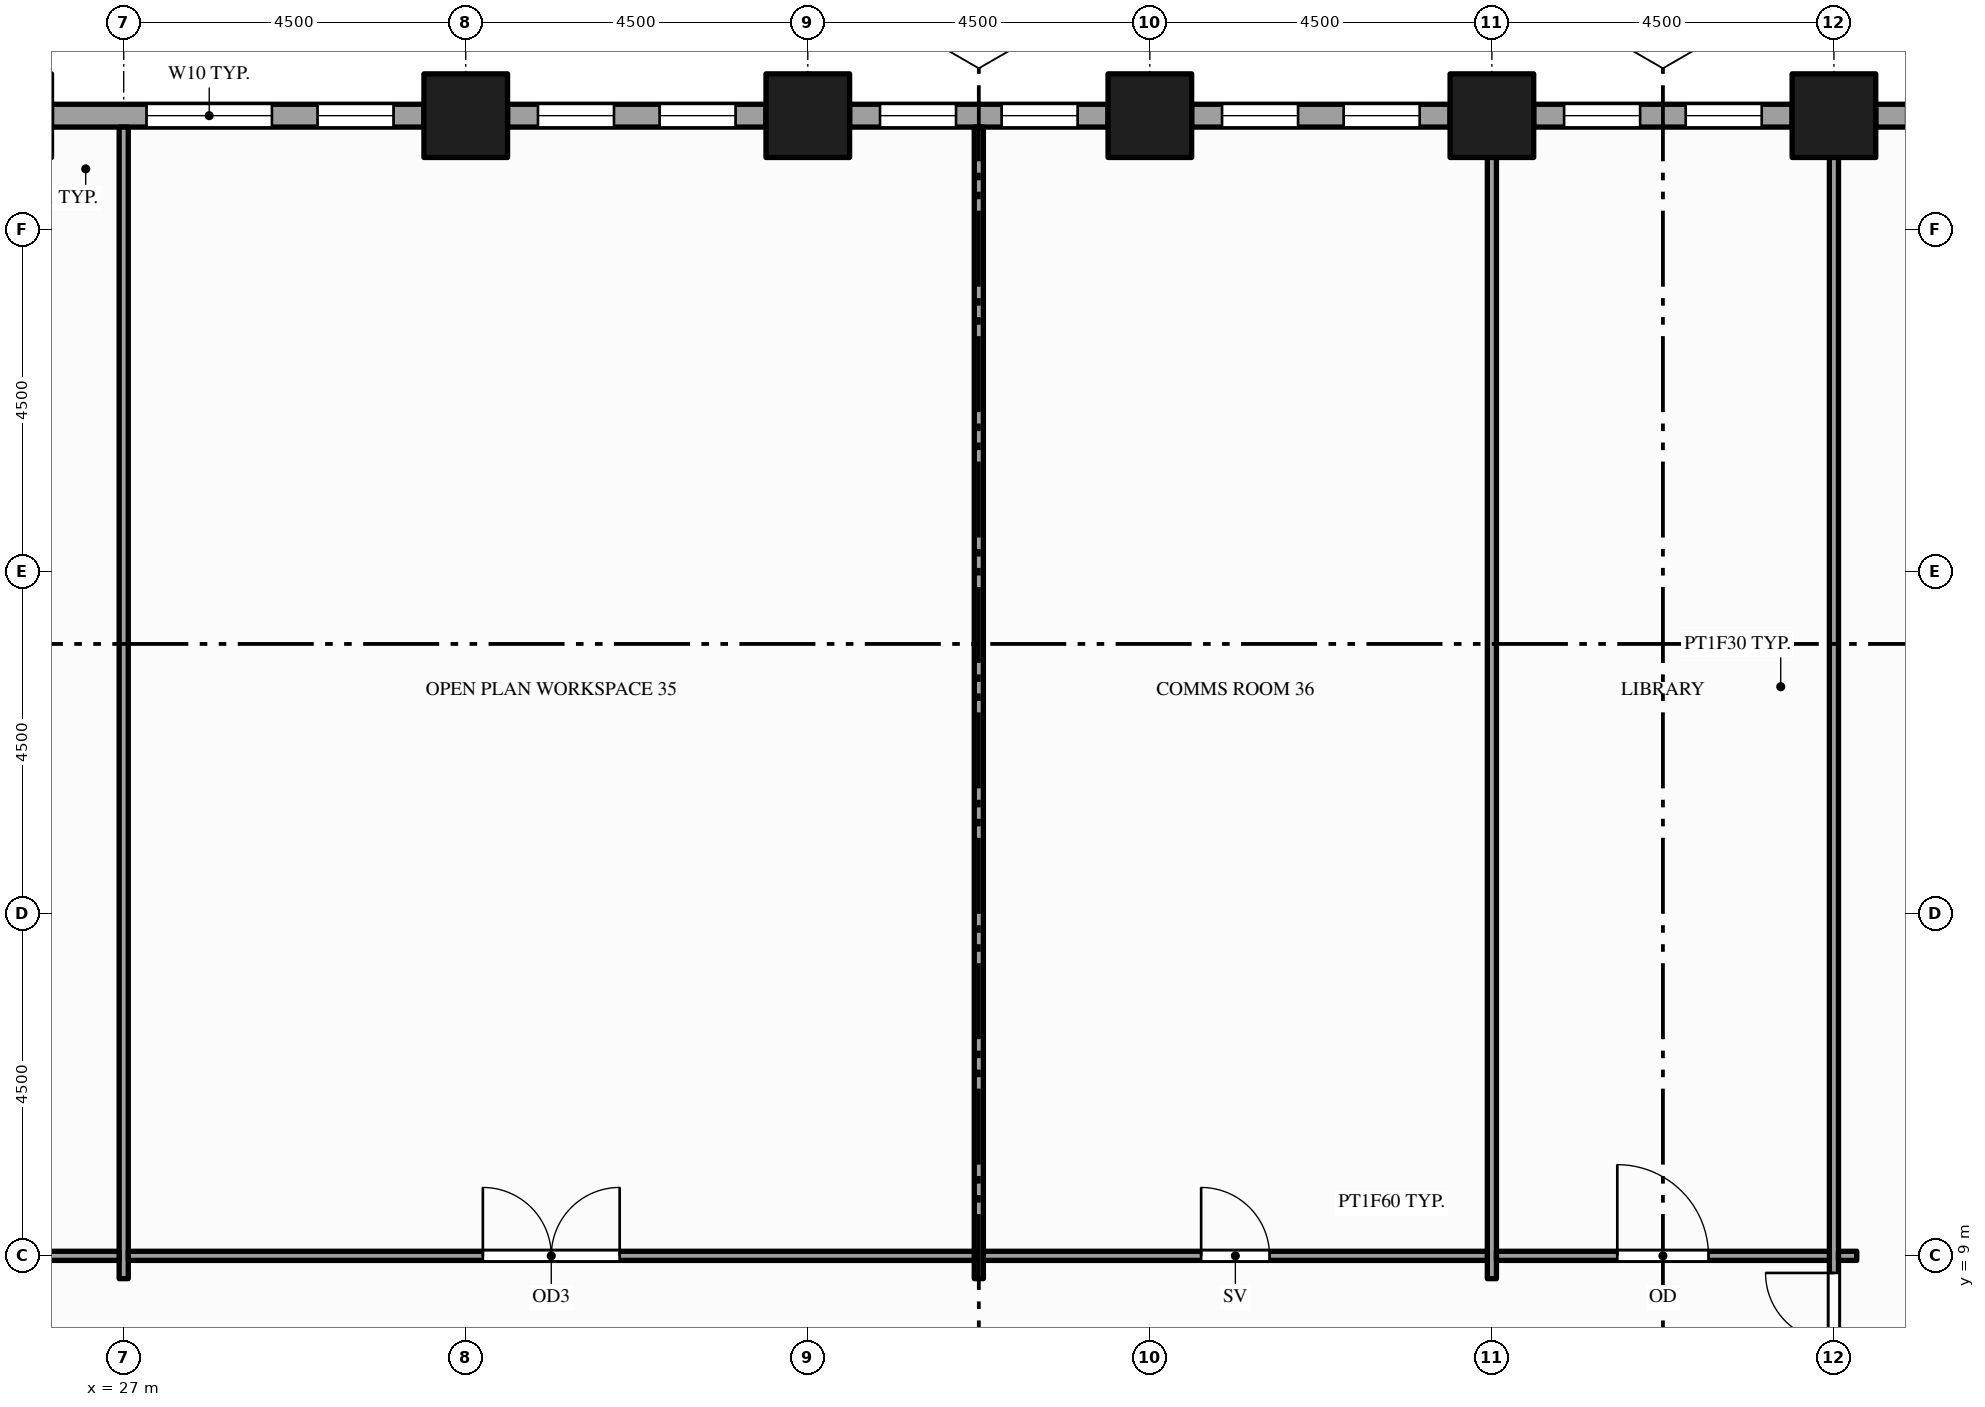
"""IFC4 building model, lengths in metres.
Left out: names, types, materials, properties, quantities, classifications, styles, units other than length and angle.
Written with IfcOpenShell. Run it as: python <this file> out.ifc"""

import sys

from ifc_helpers import new_model, si_unit, direction, frame, frame_2d, origin, origin_2d, place, context, subcontext, project, spatial, rectangle, hollow_rectangle, extrude, element, fill, save


model = new_model("IFC4")
c1 = context("Model", 3, precision=1e-05, world=origin(), true_north=direction((0.0, 1.0)))
c2 = subcontext(c1, "Body", "Model", "MODEL_VIEW")
j1 = project(units=[si_unit("LENGTHUNIT", "METRE"), si_unit("PLANEANGLEUNIT", "RADIAN")], contexts=[c1])
p1 = place(None, origin())
s1 = spatial("IfcSite", under=j1, at=p1, CompositionType="ELEMENT")
p2 = place(p1, origin())
s2 = spatial("IfcBuilding", under=s1, at=p2, CompositionType="ELEMENT")
p3 = place(p2, frame((0.0, 0.0, 57.0)))
s3 = spatial("IfcBuildingStorey", under=s2, at=p3, CompositionType="ELEMENT", Elevation=57.0)
for number, where, z_axis, x_axis in (
    (1, (31.5, 24.0, -0.15), (0.0, 0.0, 1.0), (1.0, 0.0, 0.0)),
    (2, (36.0, 24.0, -0.15), (0.0, 0.0, 1.0), (1.0, 0.0, 0.0)),
    (3, (40.5, 24.0, -0.15), (0.0, 0.0, 1.0), (1.0, 0.0, 0.0)),
    (4, (45.0, 24.0, -0.15), (0.0, 0.0, 1.0), (1.0, 0.0, 0.0)),
    (5, (49.5, 24.0, -0.15), (0.0, 0.0, 1.0), (1.0, 0.0, 0.0)),
):
    element("IfcColumn", number, at=place(p3, frame(where, z_axis=z_axis, x_axis=x_axis)), inside=s3, PredefinedType="COLUMN", context=c2, shape_type="SweptSolid", body=[
        extrude(hollow_rectangle(XDim=1.1, YDim=1.1, WallThickness=0.06, at=origin_2d()), origin(), (0.0, 0.0, 1.0), 4.0),
    ])
p4 = place(p3, frame((53.45, 24.0, 0.0), z_axis=(0.0, 0.0, 1.0), x_axis=(-1.0, 0.0, 0.0)))
e6 = element("IfcWall", 6, at=p4, inside=s3, PredefinedType="STANDARD", context=c2, shape_type="SweptSolid", body=[
    extrude(rectangle(XDim=3.4, YDim=0.3, at=frame_2d((1.7, 0.0))), origin(), (0.0, 0.0, 1.0), 3.144),
])
p5 = place(p4, frame((0.4, 0.0, 0.9)))
e7 = element("IfcOpeningElement", 7, at=p5, cuts=e6, PredefinedType="OPENING", context=c2, shape_type="SweptSolid", body=[
    extrude(rectangle(XDim=1.0, YDim=2.0, at=frame_2d((0.5, 1.0))), frame((0.0, 0.16, 0.0), z_axis=(0.0, -1.0, 0.0), x_axis=(1.0, 0.0, 0.0)), (0.0, 0.0, 1.0), 0.32),
])
p6 = place(p4, frame((2.0, 0.0, 0.9)))
e8 = element("IfcOpeningElement", 8, at=p6, cuts=e6, PredefinedType="OPENING", context=c2, shape_type="SweptSolid", body=[
    extrude(rectangle(XDim=1.0, YDim=2.0, at=frame_2d((0.5, 1.0))), frame((0.0, 0.16, 0.0), z_axis=(0.0, -1.0, 0.0), x_axis=(1.0, 0.0, 0.0)), (0.0, 0.0, 1.0), 0.32),
])
p7 = place(p3, frame((48.95, 24.0, 0.0), z_axis=(0.0, 0.0, 1.0), x_axis=(-1.0, 0.0, 0.0)))
e9 = element("IfcWall", 9, at=p7, inside=s3, PredefinedType="STANDARD", context=c2, shape_type="SweptSolid", body=[
    extrude(rectangle(XDim=3.4, YDim=0.3, at=frame_2d((1.7, 0.0))), origin(), (0.0, 0.0, 1.0), 3.144),
])
p8 = place(p7, frame((0.4, 0.0, 0.9)))
e10 = element("IfcOpeningElement", 10, at=p8, cuts=e9, PredefinedType="OPENING", context=c2, shape_type="SweptSolid", body=[
    extrude(rectangle(XDim=1.0, YDim=2.0, at=frame_2d((0.5, 1.0))), frame((0.0, 0.16, 0.0), z_axis=(0.0, -1.0, 0.0), x_axis=(1.0, 0.0, 0.0)), (0.0, 0.0, 1.0), 0.32),
])
p9 = place(p7, frame((2.0, 0.0, 0.9)))
e11 = element("IfcOpeningElement", 11, at=p9, cuts=e9, PredefinedType="OPENING", context=c2, shape_type="SweptSolid", body=[
    extrude(rectangle(XDim=1.0, YDim=2.0, at=frame_2d((0.5, 1.0))), frame((0.0, 0.16, 0.0), z_axis=(0.0, -1.0, 0.0), x_axis=(1.0, 0.0, 0.0)), (0.0, 0.0, 1.0), 0.32),
])
p10 = place(p3, frame((44.45, 24.0, 0.0), z_axis=(0.0, 0.0, 1.0), x_axis=(-1.0, 0.0, 0.0)))
e12 = element("IfcWall", 12, at=p10, inside=s3, PredefinedType="STANDARD", context=c2, shape_type="SweptSolid", body=[
    extrude(rectangle(XDim=3.4, YDim=0.3, at=frame_2d((1.7, 0.0))), origin(), (0.0, 0.0, 1.0), 3.144),
])
p11 = place(p10, frame((0.4, 0.0, 0.9)))
e13 = element("IfcOpeningElement", 13, at=p11, cuts=e12, PredefinedType="OPENING", context=c2, shape_type="SweptSolid", body=[
    extrude(rectangle(XDim=1.0, YDim=2.0, at=frame_2d((0.5, 1.0))), frame((0.0, 0.16, 0.0), z_axis=(0.0, -1.0, 0.0), x_axis=(1.0, 0.0, 0.0)), (0.0, 0.0, 1.0), 0.32),
])
p12 = place(p10, frame((2.0, 0.0, 0.9)))
e14 = element("IfcOpeningElement", 14, at=p12, cuts=e12, PredefinedType="OPENING", context=c2, shape_type="SweptSolid", body=[
    extrude(rectangle(XDim=1.0, YDim=2.0, at=frame_2d((0.5, 1.0))), frame((0.0, 0.16, 0.0), z_axis=(0.0, -1.0, 0.0), x_axis=(1.0, 0.0, 0.0)), (0.0, 0.0, 1.0), 0.32),
])
p13 = place(p3, frame((39.95, 24.0, 0.0), z_axis=(0.0, 0.0, 1.0), x_axis=(-1.0, 0.0, 0.0)))
e15 = element("IfcWall", 15, at=p13, inside=s3, PredefinedType="STANDARD", context=c2, shape_type="SweptSolid", body=[
    extrude(rectangle(XDim=3.4, YDim=0.3, at=frame_2d((1.7, 0.0))), origin(), (0.0, 0.0, 1.0), 3.144),
])
p14 = place(p13, frame((0.4, 0.0, 0.9)))
e16 = element("IfcOpeningElement", 16, at=p14, cuts=e15, PredefinedType="OPENING", context=c2, shape_type="SweptSolid", body=[
    extrude(rectangle(XDim=1.0, YDim=2.0, at=frame_2d((0.5, 1.0))), frame((0.0, 0.16, 0.0), z_axis=(0.0, -1.0, 0.0), x_axis=(1.0, 0.0, 0.0)), (0.0, 0.0, 1.0), 0.32),
])
p15 = place(p13, frame((2.0, 0.0, 0.9)))
e17 = element("IfcOpeningElement", 17, at=p15, cuts=e15, PredefinedType="OPENING", context=c2, shape_type="SweptSolid", body=[
    extrude(rectangle(XDim=1.0, YDim=2.0, at=frame_2d((0.5, 1.0))), frame((0.0, 0.16, 0.0), z_axis=(0.0, -1.0, 0.0), x_axis=(1.0, 0.0, 0.0)), (0.0, 0.0, 1.0), 0.32),
])
p16 = place(p3, frame((35.45, 24.0, 0.0), z_axis=(0.0, 0.0, 1.0), x_axis=(-1.0, 0.0, 0.0)))
e18 = element("IfcWall", 18, at=p16, inside=s3, PredefinedType="STANDARD", context=c2, shape_type="SweptSolid", body=[
    extrude(rectangle(XDim=3.4, YDim=0.3, at=frame_2d((1.7, 0.0))), origin(), (0.0, 0.0, 1.0), 3.144),
])
p17 = place(p16, frame((0.4, 0.0, 0.9)))
e19 = element("IfcOpeningElement", 19, at=p17, cuts=e18, PredefinedType="OPENING", context=c2, shape_type="SweptSolid", body=[
    extrude(rectangle(XDim=1.0, YDim=2.0, at=frame_2d((0.5, 1.0))), frame((0.0, 0.16, 0.0), z_axis=(0.0, -1.0, 0.0), x_axis=(1.0, 0.0, 0.0)), (0.0, 0.0, 1.0), 0.32),
])
p18 = place(p16, frame((2.0, 0.0, 0.9)))
e20 = element("IfcOpeningElement", 20, at=p18, cuts=e18, PredefinedType="OPENING", context=c2, shape_type="SweptSolid", body=[
    extrude(rectangle(XDim=1.0, YDim=2.0, at=frame_2d((0.5, 1.0))), frame((0.0, 0.16, 0.0), z_axis=(0.0, -1.0, 0.0), x_axis=(1.0, 0.0, 0.0)), (0.0, 0.0, 1.0), 0.32),
])
p19 = place(p3, frame((30.95, 24.0, 0.0), z_axis=(0.0, 0.0, 1.0), x_axis=(-1.0, 0.0, 0.0)))
e21 = element("IfcWall", 21, at=p19, inside=s3, PredefinedType="STANDARD", context=c2, shape_type="SweptSolid", body=[
    extrude(rectangle(XDim=4.9, YDim=0.3, at=frame_2d((2.45, 0.0))), origin(), (0.0, 0.0, 1.0), 3.144),
])
p20 = place(p19, frame((0.4, 0.0, 0.9)))
e22 = element("IfcOpeningElement", 22, at=p20, cuts=e21, PredefinedType="OPENING", context=c2, shape_type="SweptSolid", body=[
    extrude(rectangle(XDim=1.0, YDim=2.0, at=frame_2d((0.5, 1.0))), frame((0.0, 0.16, 0.0), z_axis=(0.0, -1.0, 0.0), x_axis=(1.0, 0.0, 0.0)), (0.0, 0.0, 1.0), 0.32),
])
p21 = place(p19, frame((2.0, 0.0, 0.9)))
e23 = element("IfcOpeningElement", 23, at=p21, cuts=e21, PredefinedType="OPENING", context=c2, shape_type="SweptSolid", body=[
    extrude(rectangle(XDim=1.65, YDim=2.0, at=frame_2d((0.825, 1.0))), frame((0.0, 0.16, 0.0), z_axis=(0.0, -1.0, 0.0), x_axis=(1.0, 0.0, 0.0)), (0.0, 0.0, 1.0), 0.32),
])
for number, where, z_axis, x_axis in (
    (24, (27.0, 8.7, 0.0), (0.0, 0.0, 1.0), (0.0, 1.0, 0.0)),
    (25, (38.25, 8.7, 0.0), (0.0, 0.0, 1.0), (0.0, 1.0, 0.0)),
    (26, (45.0, 8.7, 0.0), (0.0, 0.0, 1.0), (0.0, 1.0, 0.0)),
):
    element("IfcWall", number, at=place(p3, frame(where, z_axis=z_axis, x_axis=x_axis)), inside=s3, PredefinedType="PARTITIONING", context=c2, shape_type="SweptSolid", body=[
        extrude(rectangle(XDim=15.15, YDim=0.12, at=frame_2d((7.575, 0.0))), origin(), (0.0, 0.0, 1.0), 2.938),
    ])
p22 = place(p3, frame((49.5, 1.65, 0.0), z_axis=(0.0, 0.0, 1.0), x_axis=(0.0, 1.0, 0.0)))
e27 = element("IfcWall", 27, at=p22, inside=s3, PredefinedType="PARTITIONING", context=c2, shape_type="SweptSolid", body=[
    extrude(rectangle(XDim=22.2, YDim=0.12, at=frame_2d((11.1, 0.0))), origin(), (0.0, 0.0, 1.0), 2.938),
])
p23 = place(p22, frame((5.325, 0.0, 0.0)))
e28 = element("IfcOpeningElement", 28, at=p23, cuts=e27, PredefinedType="OPENING", context=c2, shape_type="SweptSolid", body=[
    extrude(rectangle(XDim=1.8, YDim=2.1, at=frame_2d((0.9, 1.05))), frame((0.0, 0.07, 0.0), z_axis=(0.0, -1.0, 0.0), x_axis=(1.0, 0.0, 0.0)), (0.0, 0.0, 1.0), 0.14),
])
p24 = place(p22, frame((0.54, 0.0, 0.0)))
e29 = element("IfcOpeningElement", 29, at=p24, cuts=e27, PredefinedType="OPENING", context=c2, shape_type="SweptSolid", body=[
    extrude(rectangle(XDim=0.9, YDim=2.1, at=frame_2d((0.45, 1.05))), frame((0.0, 0.07, 0.0), z_axis=(0.0, -1.0, 0.0), x_axis=(1.0, 0.0, 0.0)), (0.0, 0.0, 1.0), 0.14),
])
p25 = place(p22, frame((2.025, 0.0, 0.0)))
e30 = element("IfcOpeningElement", 30, at=p25, cuts=e27, PredefinedType="OPENING", context=c2, shape_type="SweptSolid", body=[
    extrude(rectangle(XDim=0.9, YDim=2.1, at=frame_2d((0.45, 1.05))), frame((0.0, 0.07, 0.0), z_axis=(0.0, -1.0, 0.0), x_axis=(1.0, 0.0, 0.0)), (0.0, 0.0, 1.0), 0.14),
])
p26 = place(p22, frame((3.51, 0.0, 0.0)))
e31 = element("IfcOpeningElement", 31, at=p26, cuts=e27, PredefinedType="OPENING", context=c2, shape_type="SweptSolid", body=[
    extrude(rectangle(XDim=1.0, YDim=2.1, at=frame_2d((0.5, 1.05))), frame((0.0, 0.07, 0.0), z_axis=(0.0, -1.0, 0.0), x_axis=(1.0, 0.0, 0.0)), (0.0, 0.0, 1.0), 0.14),
])
p27 = place(p3, frame((13.56, 9.0, 0.0), z_axis=(0.0, 0.0, 1.0), x_axis=(1.0, 0.0, 0.0)))
e32 = element("IfcWall", 32, at=p27, inside=s3, PredefinedType="PARTITIONING", context=c2, shape_type="SweptSolid", body=[
    extrude(rectangle(XDim=13.38, YDim=0.12, at=frame_2d((6.69, 0.0))), origin(), (0.0, 0.0, 1.0), 2.938),
])
p28 = place(p27, frame((3.54, 0.0, 0.0)))
e33 = element("IfcOpeningElement", 33, at=p28, cuts=e32, PredefinedType="OPENING", context=c2, shape_type="SweptSolid", body=[
    extrude(rectangle(XDim=1.8, YDim=2.1, at=frame_2d((0.9, 1.05))), frame((0.0, 0.07, 0.0), z_axis=(0.0, -1.0, 0.0), x_axis=(1.0, 0.0, 0.0)), (0.0, 0.0, 1.0), 0.14),
])
p29 = place(p3, frame((27.06, 9.0, 0.0), z_axis=(0.0, 0.0, 1.0), x_axis=(1.0, 0.0, 0.0)))
e34 = element("IfcWall", 34, at=p29, inside=s3, PredefinedType="PARTITIONING", context=c2, shape_type="SweptSolid", body=[
    extrude(rectangle(XDim=11.13, YDim=0.12, at=frame_2d((5.565, 0.0))), origin(), (0.0, 0.0, 1.0), 2.938),
])
p30 = place(p29, frame((4.665, 0.0, 0.0)))
e35 = element("IfcOpeningElement", 35, at=p30, cuts=e34, PredefinedType="OPENING", context=c2, shape_type="SweptSolid", body=[
    extrude(rectangle(XDim=1.8, YDim=2.1, at=frame_2d((0.9, 1.05))), frame((0.0, 0.07, 0.0), z_axis=(0.0, -1.0, 0.0), x_axis=(1.0, 0.0, 0.0)), (0.0, 0.0, 1.0), 0.14),
])
p31 = place(p3, frame((38.31, 9.0, 0.0), z_axis=(0.0, 0.0, 1.0), x_axis=(1.0, 0.0, 0.0)))
e36 = element("IfcWall", 36, at=p31, inside=s3, PredefinedType="PARTITIONING", context=c2, shape_type="SweptSolid", body=[
    extrude(rectangle(XDim=6.63, YDim=0.12, at=frame_2d((3.315, 0.0))), origin(), (0.0, 0.0, 1.0), 2.938),
])
p32 = place(p31, frame((2.865, 0.0, 0.0)))
e37 = element("IfcOpeningElement", 37, at=p32, cuts=e36, PredefinedType="OPENING", context=c2, shape_type="SweptSolid", body=[
    extrude(rectangle(XDim=0.9, YDim=2.1, at=frame_2d((0.45, 1.05))), frame((0.0, 0.07, 0.0), z_axis=(0.0, -1.0, 0.0), x_axis=(1.0, 0.0, 0.0)), (0.0, 0.0, 1.0), 0.14),
])
p33 = place(p3, frame((45.06, 9.0, 0.0), z_axis=(0.0, 0.0, 1.0), x_axis=(1.0, 0.0, 0.0)))
e38 = element("IfcWall", 38, at=p33, inside=s3, PredefinedType="PARTITIONING", context=c2, shape_type="SweptSolid", body=[
    extrude(rectangle(XDim=4.38, YDim=0.12, at=frame_2d((2.19, 0.0))), origin(), (0.0, 0.0, 1.0), 2.938),
])
p34 = place(p33, frame((1.59, 0.0, 0.0)))
e39 = element("IfcOpeningElement", 39, at=p34, cuts=e38, PredefinedType="OPENING", context=c2, shape_type="SweptSolid", body=[
    extrude(rectangle(XDim=1.2, YDim=2.1, at=frame_2d((0.6, 1.05))), frame((0.0, 0.07, 0.0), z_axis=(0.0, -1.0, 0.0), x_axis=(1.0, 0.0, 0.0)), (0.0, 0.0, 1.0), 0.14),
])
p35 = place(p3, frame((49.56, 9.0, 0.0), z_axis=(0.0, 0.0, 1.0), x_axis=(1.0, 0.0, 0.0)))
e40 = element("IfcWall", 40, at=p35, inside=s3, PredefinedType="PARTITIONING", context=c2, shape_type="SweptSolid", body=[
    extrude(rectangle(XDim=0.24, YDim=0.12, at=frame_2d((0.12, 0.0))), origin(), (0.0, 0.0, 1.0), 2.938),
])
p36 = place(p8, origin())
e41 = element("IfcWindow", 41, at=p36, inside=s3, PartitioningType="SINGLE_PANEL", PredefinedType="WINDOW", context=c2, shape_type="SweptSolid", body=[
    extrude(rectangle(XDim=1.0, YDim=2.0, at=frame_2d((0.5, 1.0))), frame((0.0, 0.03, 0.0), z_axis=(0.0, -1.0, 0.0), x_axis=(1.0, 0.0, 0.0)), (0.0, 0.0, 1.0), 0.06),
])
fill(e10, e41)
p37 = place(p9, origin())
e42 = element("IfcWindow", 42, at=p37, inside=s3, PartitioningType="SINGLE_PANEL", PredefinedType="WINDOW", context=c2, shape_type="SweptSolid", body=[
    extrude(rectangle(XDim=1.0, YDim=2.0, at=frame_2d((0.5, 1.0))), frame((0.0, 0.03, 0.0), z_axis=(0.0, -1.0, 0.0), x_axis=(1.0, 0.0, 0.0)), (0.0, 0.0, 1.0), 0.06),
])
fill(e11, e42)
p38 = place(p11, origin())
e43 = element("IfcWindow", 43, at=p38, inside=s3, PartitioningType="SINGLE_PANEL", PredefinedType="WINDOW", context=c2, shape_type="SweptSolid", body=[
    extrude(rectangle(XDim=1.0, YDim=2.0, at=frame_2d((0.5, 1.0))), frame((0.0, 0.03, 0.0), z_axis=(0.0, -1.0, 0.0), x_axis=(1.0, 0.0, 0.0)), (0.0, 0.0, 1.0), 0.06),
])
fill(e13, e43)
p39 = place(p12, origin())
e44 = element("IfcWindow", 44, at=p39, inside=s3, PartitioningType="SINGLE_PANEL", PredefinedType="WINDOW", context=c2, shape_type="SweptSolid", body=[
    extrude(rectangle(XDim=1.0, YDim=2.0, at=frame_2d((0.5, 1.0))), frame((0.0, 0.03, 0.0), z_axis=(0.0, -1.0, 0.0), x_axis=(1.0, 0.0, 0.0)), (0.0, 0.0, 1.0), 0.06),
])
fill(e14, e44)
p40 = place(p14, origin())
e45 = element("IfcWindow", 45, at=p40, inside=s3, PartitioningType="SINGLE_PANEL", PredefinedType="WINDOW", context=c2, shape_type="SweptSolid", body=[
    extrude(rectangle(XDim=1.0, YDim=2.0, at=frame_2d((0.5, 1.0))), frame((0.0, 0.03, 0.0), z_axis=(0.0, -1.0, 0.0), x_axis=(1.0, 0.0, 0.0)), (0.0, 0.0, 1.0), 0.06),
])
fill(e16, e45)
p41 = place(p15, origin())
e46 = element("IfcWindow", 46, at=p41, inside=s3, PartitioningType="SINGLE_PANEL", PredefinedType="WINDOW", context=c2, shape_type="SweptSolid", body=[
    extrude(rectangle(XDim=1.0, YDim=2.0, at=frame_2d((0.5, 1.0))), frame((0.0, 0.03, 0.0), z_axis=(0.0, -1.0, 0.0), x_axis=(1.0, 0.0, 0.0)), (0.0, 0.0, 1.0), 0.06),
])
fill(e17, e46)
p42 = place(p17, origin())
e47 = element("IfcWindow", 47, at=p42, inside=s3, PartitioningType="SINGLE_PANEL", PredefinedType="WINDOW", context=c2, shape_type="SweptSolid", body=[
    extrude(rectangle(XDim=1.0, YDim=2.0, at=frame_2d((0.5, 1.0))), frame((0.0, 0.03, 0.0), z_axis=(0.0, -1.0, 0.0), x_axis=(1.0, 0.0, 0.0)), (0.0, 0.0, 1.0), 0.06),
])
fill(e19, e47)
p43 = place(p18, origin())
e48 = element("IfcWindow", 48, at=p43, inside=s3, PartitioningType="SINGLE_PANEL", PredefinedType="WINDOW", context=c2, shape_type="SweptSolid", body=[
    extrude(rectangle(XDim=1.0, YDim=2.0, at=frame_2d((0.5, 1.0))), frame((0.0, 0.03, 0.0), z_axis=(0.0, -1.0, 0.0), x_axis=(1.0, 0.0, 0.0)), (0.0, 0.0, 1.0), 0.06),
])
fill(e20, e48)
p44 = place(p20, origin())
e49 = element("IfcWindow", 49, at=p44, inside=s3, PartitioningType="SINGLE_PANEL", PredefinedType="WINDOW", context=c2, shape_type="SweptSolid", body=[
    extrude(rectangle(XDim=1.0, YDim=2.0, at=frame_2d((0.5, 1.0))), frame((0.0, 0.03, 0.0), z_axis=(0.0, -1.0, 0.0), x_axis=(1.0, 0.0, 0.0)), (0.0, 0.0, 1.0), 0.06),
])
fill(e22, e49)
p45 = place(p21, origin())
e50 = element("IfcWindow", 50, at=p45, inside=s3, PartitioningType="SINGLE_PANEL", PredefinedType="WINDOW", context=c2, shape_type="SweptSolid", body=[
    extrude(rectangle(XDim=1.65, YDim=2.0, at=frame_2d((0.825, 1.0))), frame((0.0, 0.03, 0.0), z_axis=(0.0, -1.0, 0.0), x_axis=(1.0, 0.0, 0.0)), (0.0, 0.0, 1.0), 0.06),
])
fill(e23, e50)
p46 = place(p23, origin())
e51 = element("IfcDoor", 51, at=p46, inside=s3, OperationType="DOUBLE_DOOR_SINGLE_SWING", PredefinedType="DOOR", context=c2, shape_type="SweptSolid", body=[
    extrude(rectangle(XDim=1.8, YDim=2.1, at=frame_2d((0.9, 1.05))), frame((0.0, 0.025, 0.0), z_axis=(0.0, -1.0, 0.0), x_axis=(1.0, 0.0, 0.0)), (0.0, 0.0, 1.0), 0.05),
])
fill(e28, e51)
p47 = place(p30, origin())
e52 = element("IfcDoor", 52, at=p47, inside=s3, OperationType="DOUBLE_DOOR_SINGLE_SWING", PredefinedType="DOOR", context=c2, shape_type="SweptSolid", body=[
    extrude(rectangle(XDim=1.8, YDim=2.1, at=frame_2d((0.9, 1.05))), frame((0.0, 0.025, 0.0), z_axis=(0.0, -1.0, 0.0), x_axis=(1.0, 0.0, 0.0)), (0.0, 0.0, 1.0), 0.05),
])
fill(e35, e52)
p48 = place(p32, origin())
e53 = element("IfcDoor", 53, at=p48, inside=s3, OperationType="SINGLE_SWING_LEFT", PredefinedType="DOOR", context=c2, shape_type="SweptSolid", body=[
    extrude(rectangle(XDim=0.9, YDim=2.1, at=frame_2d((0.45, 1.05))), frame((0.0, 0.025, 0.0), z_axis=(0.0, -1.0, 0.0), x_axis=(1.0, 0.0, 0.0)), (0.0, 0.0, 1.0), 0.05),
])
fill(e37, e53)
p49 = place(p34, origin())
e54 = element("IfcDoor", 54, at=p49, inside=s3, OperationType="SINGLE_SWING_LEFT", PredefinedType="DOOR", context=c2, shape_type="SweptSolid", body=[
    extrude(rectangle(XDim=1.2, YDim=2.1, at=frame_2d((0.6, 1.05))), frame((0.0, 0.025, 0.0), z_axis=(0.0, -1.0, 0.0), x_axis=(1.0, 0.0, 0.0)), (0.0, 0.0, 1.0), 0.05),
])
fill(e39, e54)
save(model, sys.argv[1])
